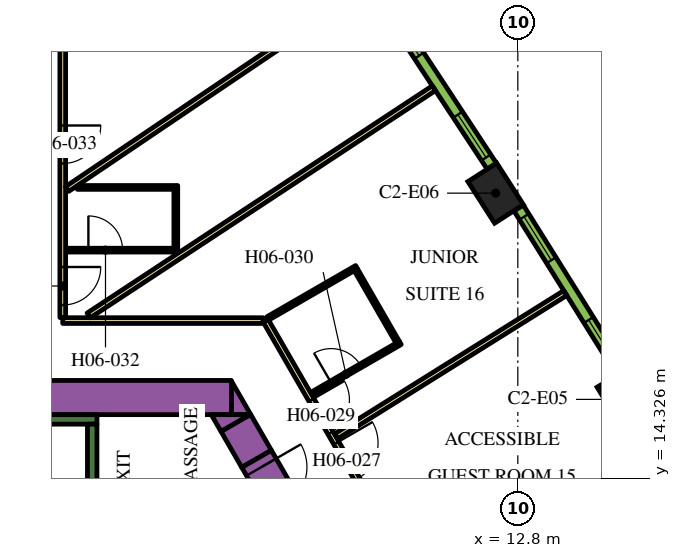
"""IFC4 building model, lengths in metres.
Left out: names, types, materials, properties, quantities, classifications, styles, units other than length and angle.
Written with IfcOpenShell. Run it as: python <this file> out.ifc"""

import sys

from ifc_helpers import new_model, si_unit, direction, frame, frame_2d, origin, origin_2d, place, context, subcontext, project, spatial, polyline, rectangle, outline, extrude, element, fill, save


model = new_model("IFC4")
c1 = context("Model", 3, precision=1e-05, world=origin(), true_north=direction((0.0, 1.0)))
c2 = subcontext(c1, "Body", "Model", "MODEL_VIEW")
j1 = project(units=[si_unit("LENGTHUNIT", "METRE"), si_unit("PLANEANGLEUNIT", "RADIAN")], contexts=[c1])
p1 = place(None, origin())
s1 = spatial("IfcSite", under=j1, at=p1, CompositionType="ELEMENT")
p2 = place(p1, origin())
s2 = spatial("IfcBuilding", under=s1, at=p2, CompositionType="ELEMENT")
p3 = place(p2, frame((0.0, 0.0, 87.6)))
s3 = spatial("IfcBuildingStorey", under=s2, at=p3, CompositionType="ELEMENT", Elevation=87.6)
for number, where, z_axis, x_axis in (
    (1, (15.609, 16.402, 0.0), (0.0, 0.0, 1.0), (-0.52, 0.854, 0.0)),
    (2, (12.217, 21.828, 0.0), (0.0, 0.0, 1.0), (-0.54, 0.842, 0.0)),
):
    element("IfcColumn", number, at=place(p3, frame(where, z_axis=z_axis, x_axis=x_axis)), inside=s3, PredefinedType="COLUMN", context=c2, shape_type="SweptSolid", body=[
        extrude(rectangle(XDim=1.3, YDim=0.9, at=origin_2d()), origin(), (0.0, 0.0, 1.0), 3.9),
    ])
p4 = place(p3, frame((-4.224, 16.45, 0.0), z_axis=(0.0, 0.0, 1.0), x_axis=(1.0, 0.0, 0.0)))
e3 = element("IfcWall", 3, at=p4, inside=s3, PredefinedType="SOLIDWALL", context=c2, shape_type="SweptSolid", body=[
    extrude(rectangle(XDim=9.488, YDim=0.9, at=frame_2d((4.744, 0.0))), origin(), (0.0, 0.0, 1.0), 3.9),
])
p5 = place(p3, origin())
e4 = element("IfcWall", 4, at=p5, inside=s3, PredefinedType="SOLIDWALL", context=c2, shape_type="SweptSolid", body=[
    extrude(outline(polyline([(5.265, 16.0), (5.265, 16.88), (5.773, 16.0), (5.265, 16.0)])), origin(), (0.0, 0.0, 1.0), 3.9),
])
p6 = place(p3, frame((5.926, 14.836, 0.0), z_axis=(0.0, 0.0, 1.0), x_axis=(-0.500076735116, 0.865981096212, 0.0)))
e5 = element("IfcWall", 5, at=p6, inside=s3, PredefinedType="SOLIDWALL", context=c2, shape_type="SweptSolid", body=[
    extrude(rectangle(XDim=1.094, YDim=0.9, at=frame_2d((0.547, 0.0))), origin(), (0.0, 0.0, 1.0), 3.9),
])
e6 = element("IfcWall", 6, at=p5, inside=s3, PredefinedType="SOLIDWALL", context=c2, shape_type="SweptSolid", body=[
    extrude(outline(polyline([(4.734, 16.0), (5.75, 16.0), (4.988, 15.56), (4.734, 16.0)])), origin(), (0.0, 0.0, 1.0), 3.9),
])
p7 = place(p3, frame((-1.725, 15.875, 0.0), z_axis=(0.0, 0.0, 1.0), x_axis=(1.0, 0.0, 0.0)))
e7 = element("IfcWall", 7, at=p7, inside=s3, PredefinedType="SOLIDWALL", context=c2, shape_type="SweptSolid", body=[
    extrude(rectangle(XDim=3.45, YDim=0.25, at=frame_2d((1.725, 0.0))), origin(), (0.0, 0.0, 1.0), 3.9),
])
p8 = place(p3, frame((1.6, 8.95, 0.0), z_axis=(0.0, 0.0, 1.0), x_axis=(0.0, 1.0, 0.0)))
e8 = element("IfcWall", 8, at=p8, inside=s3, PredefinedType="SOLIDWALL", context=c2, shape_type="SweptSolid", body=[
    extrude(rectangle(XDim=6.8, YDim=0.25, at=frame_2d((3.4, 0.0))), origin(), (0.0, 0.0, 1.0), 3.9),
])
p9 = place(p3, frame((5.926, 14.836, 0.0), z_axis=(0.0, 0.0, 1.0), x_axis=(0.500062241894, -0.865989465428, 0.0)))
e9 = element("IfcWall", 9, at=p9, inside=s3, PredefinedType="SOLIDWALL", context=c2, shape_type="SweptSolid", body=[
    extrude(rectangle(XDim=1.7, YDim=0.9, at=frame_2d((0.85, 0.0))), origin(), (0.0, 0.0, 1.0), 3.9),
])
p10 = place(p9, frame((0.25, 0.0, 0.0)))
e10 = element("IfcOpeningElement", 10, at=p10, cuts=e9, PredefinedType="OPENING", context=c2, shape_type="SweptSolid", body=[
    extrude(rectangle(XDim=1.2, YDim=2.1, at=frame_2d((0.6, 1.05))), frame((0.0, 0.46, 0.0), z_axis=(0.0, -1.0, 0.0), x_axis=(1.0, 0.0, 0.0)), (0.0, 0.0, 1.0), 0.92),
])
p11 = place(p3, frame((6.163, 18.475, 0.0), z_axis=(0.0, 0.0, 1.0), x_axis=(0.500001317485, -0.866024643133, 0.0)))
e11 = element("IfcWall", 11, at=p11, inside=s3, PredefinedType="PARTITIONING", context=c2, shape_type="SweptSolid", body=[
    extrude(rectangle(XDim=25.767, YDim=0.15, at=frame_2d((12.883, 0.0))), origin(), (0.0, 0.0, 1.0), 2.75),
])
p12 = place(p11, frame((24.241, 0.0, 0.0)))
e12 = element("IfcOpeningElement", 12, at=p12, cuts=e11, PredefinedType="OPENING", context=c2, shape_type="SweptSolid", body=[
    extrude(rectangle(XDim=1.0, YDim=2.1, at=frame_2d((0.5, 1.05))), frame((0.0, 0.085, 0.0), z_axis=(0.0, -1.0, 0.0), x_axis=(1.0, 0.0, 0.0)), (0.0, 0.0, 1.0), 0.17),
])
p13 = place(p11, frame((13.144, 0.0, 0.0)))
e13 = element("IfcOpeningElement", 13, at=p13, cuts=e11, PredefinedType="OPENING", context=c2, shape_type="SweptSolid", body=[
    extrude(rectangle(XDim=1.0, YDim=2.1, at=frame_2d((0.5, 1.05))), frame((0.0, 0.085, 0.0), z_axis=(0.0, -1.0, 0.0), x_axis=(1.0, 0.0, 0.0)), (0.0, 0.0, 1.0), 0.17),
])
p14 = place(p11, frame((10.874, 0.0, 0.0)))
e14 = element("IfcOpeningElement", 14, at=p14, cuts=e11, PredefinedType="OPENING", context=c2, shape_type="SweptSolid", body=[
    extrude(rectangle(XDim=0.9, YDim=2.1, at=frame_2d((0.45, 1.05))), frame((0.0, 0.085, 0.0), z_axis=(0.0, -1.0, 0.0), x_axis=(1.0, 0.0, 0.0)), (0.0, 0.0, 1.0), 0.17),
])
p15 = place(p11, frame((3.718, 0.0, 0.0)))
e15 = element("IfcOpeningElement", 15, at=p15, cuts=e11, PredefinedType="OPENING", context=c2, shape_type="SweptSolid", body=[
    extrude(rectangle(XDim=1.1, YDim=2.1, at=frame_2d((0.55, 1.05))), frame((0.0, 0.085, 0.0), z_axis=(0.0, -1.0, 0.0), x_axis=(1.0, 0.0, 0.0)), (0.0, 0.0, 1.0), 0.17),
])
p16 = place(p11, frame((2.411, 0.0, 0.0)))
e16 = element("IfcOpeningElement", 16, at=p16, cuts=e11, PredefinedType="OPENING", context=c2, shape_type="SweptSolid", body=[
    extrude(rectangle(XDim=1.0, YDim=2.1, at=frame_2d((0.5, 1.05))), frame((0.0, 0.085, 0.0), z_axis=(0.0, -1.0, 0.0), x_axis=(1.0, 0.0, 0.0)), (0.0, 0.0, 1.0), 0.17),
])
p17 = place(p3, frame((0.825, 18.475, 0.0), z_axis=(0.0, 0.0, 1.0), x_axis=(1.0, 0.0, 0.0)))
e17 = element("IfcWall", 17, at=p17, inside=s3, PredefinedType="PARTITIONING", context=c2, shape_type="SweptSolid", body=[
    extrude(rectangle(XDim=5.268, YDim=0.15, at=frame_2d((2.634, 0.0))), origin(), (0.0, 0.0, 1.0), 2.75),
])
p18 = place(p3, frame((0.825, 32.098, 0.0), z_axis=(0.0, 0.0, 1.0), x_axis=(0.0, -1.0, 0.0)))
e18 = element("IfcWall", 18, at=p18, inside=s3, PredefinedType="PARTITIONING", context=c2, shape_type="SweptSolid", body=[
    extrude(rectangle(XDim=13.543, YDim=0.15, at=frame_2d((6.772, 0.0))), origin(), (0.0, 0.0, 1.0), 2.75),
])
p19 = place(p18, frame((12.213, 0.0, 0.0)))
e19 = element("IfcOpeningElement", 19, at=p19, cuts=e18, PredefinedType="OPENING", context=c2, shape_type="SweptSolid", body=[
    extrude(rectangle(XDim=1.0, YDim=2.1, at=frame_2d((0.5, 1.05))), frame((0.0, 0.085, 0.0), z_axis=(0.0, -1.0, 0.0), x_axis=(1.0, 0.0, 0.0)), (0.0, 0.0, 1.0), 0.17),
])
p20 = place(p18, frame((8.49, 0.0, 0.0)))
e20 = element("IfcOpeningElement", 20, at=p20, cuts=e18, PredefinedType="OPENING", context=c2, shape_type="SweptSolid", body=[
    extrude(rectangle(XDim=1.0, YDim=2.1, at=frame_2d((0.5, 1.05))), frame((0.0, 0.085, 0.0), z_axis=(0.0, -1.0, 0.0), x_axis=(1.0, 0.0, 0.0)), (0.0, 0.0, 1.0), 0.17),
])
p21 = place(p3, frame((8.326, 26.923, 0.0), z_axis=(0.0, 0.0, 1.0), x_axis=(-0.828836601893, -0.5594907393, 0.0)))
e21 = element("IfcWall", 21, at=p21, inside=s3, PredefinedType="PARTITIONING", context=c2, shape_type="SweptSolid", body=[
    extrude(rectangle(XDim=8.909, YDim=0.15, at=frame_2d((4.455, 0.0))), origin(), (0.0, 0.0, 1.0), 2.75),
])
p22 = place(p3, frame((10.592, 24.589, 0.0), z_axis=(0.0, 0.0, 1.0), x_axis=(-0.835337323748, -0.549737715236, 0.0)))
e22 = element("IfcWall", 22, at=p22, inside=s3, PredefinedType="PARTITIONING", context=c2, shape_type="SweptSolid", body=[
    extrude(rectangle(XDim=10.875, YDim=0.15, at=frame_2d((5.438, 0.0))), origin(), (0.0, 0.0, 1.0), 2.75),
])
p23 = place(p3, frame((14.049, 19.2, 0.0), z_axis=(0.0, 0.0, 1.0), x_axis=(-0.847955867271, -0.530066832731, 0.0)))
e23 = element("IfcWall", 23, at=p23, inside=s3, PredefinedType="PARTITIONING", context=c2, shape_type="SweptSolid", body=[
    extrude(rectangle(XDim=7.111, YDim=0.15, at=frame_2d((3.556, 0.0))), origin(), (0.0, 0.0, 1.0), 2.75),
])
p24 = place(p3, frame((7.368, 16.538, 0.0), z_axis=(0.0, 0.0, 1.0), x_axis=(0.866036505625, 0.499980770555, 0.0)))
e24 = element("IfcWall", 24, at=p24, inside=s3, PredefinedType="PARTITIONING", context=c2, shape_type="SweptSolid", body=[
    extrude(rectangle(XDim=2.7, YDim=0.1, at=frame_2d((1.35, 0.0))), origin(), (0.0, 0.0, 1.0), 2.75),
])
p25 = place(p24, frame((0.6, 0.0, 0.0)))
e25 = element("IfcOpeningElement", 25, at=p25, cuts=e24, PredefinedType="OPENING", context=c2, shape_type="SweptSolid", body=[
    extrude(rectangle(XDim=0.9, YDim=2.1, at=frame_2d((0.45, 1.05))), frame((0.0, 0.06, 0.0), z_axis=(0.0, -1.0, 0.0), x_axis=(1.0, 0.0, 0.0)), (0.0, 0.0, 1.0), 0.12),
])
p26 = place(p3, frame((9.638, 17.906, 0.0), z_axis=(0.0, 0.0, 1.0), x_axis=(-0.50002983664, 0.866008176907, 0.0)))
e26 = element("IfcWall", 26, at=p26, inside=s3, PredefinedType="PARTITIONING", context=c2, shape_type="SweptSolid", body=[
    extrude(rectangle(XDim=2.2, YDim=0.1, at=frame_2d((1.1, 0.0))), origin(), (0.0, 0.0, 1.0), 2.75),
])
p27 = place(p3, frame((6.218, 18.53, 0.0), z_axis=(0.0, 0.0, 1.0), x_axis=(0.86599734893, 0.500048589285, 0.0)))
e27 = element("IfcWall", 27, at=p27, inside=s3, PredefinedType="PARTITIONING", context=c2, shape_type="SweptSolid", body=[
    extrude(rectangle(XDim=2.7, YDim=0.1, at=frame_2d((1.35, 0.0))), origin(), (0.0, 0.0, 1.0), 2.75),
])
p28 = place(p3, frame((0.9, 20.329, 0.0), z_axis=(0.0, 0.0, 1.0), x_axis=(1.0, 0.0, 0.0)))
e28 = element("IfcWall", 28, at=p28, inside=s3, PredefinedType="PARTITIONING", context=c2, shape_type="SweptSolid", body=[
    extrude(rectangle(XDim=2.95, YDim=0.1, at=frame_2d((1.475, 0.0))), origin(), (0.0, 0.0, 1.0), 2.75),
])
p29 = place(p28, frame((0.6, 0.0, 0.0)))
e29 = element("IfcOpeningElement", 29, at=p29, cuts=e28, PredefinedType="OPENING", context=c2, shape_type="SweptSolid", body=[
    extrude(rectangle(XDim=0.9, YDim=2.1, at=frame_2d((0.45, 1.05))), frame((0.0, 0.06, 0.0), z_axis=(0.0, -1.0, 0.0), x_axis=(1.0, 0.0, 0.0)), (0.0, 0.0, 1.0), 0.12),
])
p30 = place(p3, frame((3.8, 20.378, 0.0), z_axis=(0.0, 0.0, 1.0), x_axis=(0.0, 1.0, 0.0)))
e30 = element("IfcWall", 30, at=p30, inside=s3, PredefinedType="PARTITIONING", context=c2, shape_type="SweptSolid", body=[
    extrude(rectangle(XDim=1.55, YDim=0.1, at=frame_2d((0.775, 0.0))), origin(), (0.0, 0.0, 1.0), 2.75),
])
p31 = place(p3, frame((1.21, 21.979, 0.0), z_axis=(0.0, 0.0, 1.0), x_axis=(1.0, 0.0, 0.0)))
e31 = element("IfcWall", 31, at=p31, inside=s3, PredefinedType="PARTITIONING", context=c2, shape_type="SweptSolid", body=[
    extrude(rectangle(XDim=2.64, YDim=0.1, at=frame_2d((1.32, 0.0))), origin(), (0.0, 0.0, 1.0), 2.75),
])
p32 = place(p3, frame((15.524, 17.114, 0.0), z_axis=(0.0, 0.0, 1.0), x_axis=(-0.530072082134, 0.847952585787, 0.0)))
e32 = element("IfcWall", 32, at=p32, inside=s3, PredefinedType="SOLIDWALL", context=c2, shape_type="SweptSolid", body=[
    extrude(rectangle(XDim=5.1, YDim=0.29, at=frame_2d((2.55, 0.0))), origin(), (0.0, 0.0, 1.0), 3.65),
])
p33 = place(p32, frame((0.273, 0.0, 0.9)))
e33 = element("IfcOpeningElement", 33, at=p33, cuts=e32, PredefinedType="OPENING", context=c2, shape_type="SweptSolid", body=[
    extrude(rectangle(XDim=1.35, YDim=2.15, at=frame_2d((0.675, 1.075))), frame((0.0, 0.155, 0.0), z_axis=(0.0, -1.0, 0.0), x_axis=(1.0, 0.0, 0.0)), (0.0, 0.0, 1.0), 0.31),
])
p34 = place(p32, frame((3.478, 0.0, 0.9)))
e34 = element("IfcOpeningElement", 34, at=p34, cuts=e32, PredefinedType="OPENING", context=c2, shape_type="SweptSolid", body=[
    extrude(rectangle(XDim=1.35, YDim=2.15, at=frame_2d((0.675, 1.075))), frame((0.0, 0.155, 0.0), z_axis=(0.0, -1.0, 0.0), x_axis=(1.0, 0.0, 0.0)), (0.0, 0.0, 1.0), 0.31),
])
p35 = place(p3, frame((12.115, 22.539, 0.0), z_axis=(0.0, 0.0, 1.0), x_axis=(-0.549741341923, 0.835334937005, 0.0)))
e35 = element("IfcWall", 35, at=p35, inside=s3, PredefinedType="SOLIDWALL", context=c2, shape_type="SweptSolid", body=[
    extrude(rectangle(XDim=5.1, YDim=0.29, at=frame_2d((2.55, 0.0))), origin(), (0.0, 0.0, 1.0), 3.65),
])
p36 = place(p35, frame((0.273, 0.0, 0.9)))
e36 = element("IfcOpeningElement", 36, at=p36, cuts=e35, PredefinedType="OPENING", context=c2, shape_type="SweptSolid", body=[
    extrude(rectangle(XDim=1.35, YDim=2.15, at=frame_2d((0.675, 1.075))), frame((0.0, 0.155, 0.0), z_axis=(0.0, -1.0, 0.0), x_axis=(1.0, 0.0, 0.0)), (0.0, 0.0, 1.0), 0.31),
])
p37 = place(p35, frame((3.478, 0.0, 0.9)))
e37 = element("IfcOpeningElement", 37, at=p37, cuts=e35, PredefinedType="OPENING", context=c2, shape_type="SweptSolid", body=[
    extrude(rectangle(XDim=1.35, YDim=2.15, at=frame_2d((0.675, 1.075))), frame((0.0, 0.155, 0.0), z_axis=(0.0, -1.0, 0.0), x_axis=(1.0, 0.0, 0.0)), (0.0, 0.0, 1.0), 0.31),
])
p38 = place(p10, origin())
e38 = element("IfcDoor", 38, at=p38, inside=s3, OperationType="SINGLE_SWING_LEFT", PredefinedType="DOOR", context=c2, shape_type="SweptSolid", body=[
    extrude(rectangle(XDim=1.2, YDim=2.1, at=frame_2d((0.6, 1.05))), frame((0.0, 0.025, 0.0), z_axis=(0.0, -1.0, 0.0), x_axis=(1.0, 0.0, 0.0)), (0.0, 0.0, 1.0), 0.05),
])
fill(e10, e38)
p39 = place(p15, origin())
e39 = element("IfcDoor", 39, at=p39, inside=s3, OperationType="SINGLE_SWING_LEFT", PredefinedType="DOOR", context=c2, shape_type="SweptSolid", body=[
    extrude(rectangle(XDim=1.1, YDim=2.1, at=frame_2d((0.55, 1.05))), frame((0.0, 0.025, 0.0), z_axis=(0.0, -1.0, 0.0), x_axis=(1.0, 0.0, 0.0)), (0.0, 0.0, 1.0), 0.05),
])
fill(e15, e39)
p40 = place(p16, origin())
e40 = element("IfcDoor", 40, at=p40, inside=s3, OperationType="SINGLE_SWING_RIGHT", PredefinedType="DOOR", context=c2, shape_type="SweptSolid", body=[
    extrude(rectangle(XDim=1.0, YDim=2.1, at=frame_2d((0.5, 1.05))), frame((0.0, 0.025, 0.0), z_axis=(0.0, -1.0, 0.0), x_axis=(1.0, 0.0, 0.0)), (0.0, 0.0, 1.0), 0.05),
])
fill(e16, e40)
p41 = place(p25, origin())
e41 = element("IfcDoor", 41, at=p41, inside=s3, OperationType="SINGLE_SWING_LEFT", PredefinedType="DOOR", context=c2, shape_type="SweptSolid", body=[
    extrude(rectangle(XDim=0.9, YDim=2.1, at=frame_2d((0.45, 1.05))), frame((0.0, 0.025, 0.0), z_axis=(0.0, -1.0, 0.0), x_axis=(1.0, 0.0, 0.0)), (0.0, 0.0, 1.0), 0.05),
])
fill(e25, e41)
p42 = place(p19, origin())
e42 = element("IfcDoor", 42, at=p42, inside=s3, OperationType="SINGLE_SWING_RIGHT", PredefinedType="DOOR", context=c2, shape_type="SweptSolid", body=[
    extrude(rectangle(XDim=1.0, YDim=2.1, at=frame_2d((0.5, 1.05))), frame((0.0, 0.025, 0.0), z_axis=(0.0, -1.0, 0.0), x_axis=(1.0, 0.0, 0.0)), (0.0, 0.0, 1.0), 0.05),
])
fill(e19, e42)
p43 = place(p29, origin())
e43 = element("IfcDoor", 43, at=p43, inside=s3, OperationType="SINGLE_SWING_LEFT", PredefinedType="DOOR", context=c2, shape_type="SweptSolid", body=[
    extrude(rectangle(XDim=0.9, YDim=2.1, at=frame_2d((0.45, 1.05))), frame((0.0, 0.025, 0.0), z_axis=(0.0, -1.0, 0.0), x_axis=(1.0, 0.0, 0.0)), (0.0, 0.0, 1.0), 0.05),
])
fill(e29, e43)
p44 = place(p20, origin())
e44 = element("IfcDoor", 44, at=p44, inside=s3, OperationType="SINGLE_SWING_RIGHT", PredefinedType="DOOR", context=c2, shape_type="SweptSolid", body=[
    extrude(rectangle(XDim=1.0, YDim=2.1, at=frame_2d((0.5, 1.05))), frame((0.0, 0.025, 0.0), z_axis=(0.0, -1.0, 0.0), x_axis=(1.0, 0.0, 0.0)), (0.0, 0.0, 1.0), 0.05),
])
fill(e20, e44)
p45 = place(p33, origin())
e45 = element("IfcWindow", 45, at=p45, inside=s3, PartitioningType="DOUBLE_PANEL_VERTICAL", PredefinedType="WINDOW", context=c2, shape_type="SweptSolid", body=[
    extrude(rectangle(XDim=1.35, YDim=2.15, at=frame_2d((0.675, 1.075))), frame((0.0, 0.015, 0.0), z_axis=(0.0, -1.0, 0.0), x_axis=(1.0, 0.0, 0.0)), (0.0, 0.0, 1.0), 0.06),
])
fill(e33, e45)
p46 = place(p34, origin())
e46 = element("IfcWindow", 46, at=p46, inside=s3, PartitioningType="DOUBLE_PANEL_VERTICAL", PredefinedType="WINDOW", context=c2, shape_type="SweptSolid", body=[
    extrude(rectangle(XDim=1.35, YDim=2.15, at=frame_2d((0.675, 1.075))), frame((0.0, 0.015, 0.0), z_axis=(0.0, -1.0, 0.0), x_axis=(1.0, 0.0, 0.0)), (0.0, 0.0, 1.0), 0.06),
])
fill(e34, e46)
p47 = place(p36, origin())
e47 = element("IfcWindow", 47, at=p47, inside=s3, PartitioningType="DOUBLE_PANEL_VERTICAL", PredefinedType="WINDOW", context=c2, shape_type="SweptSolid", body=[
    extrude(rectangle(XDim=1.35, YDim=2.15, at=frame_2d((0.675, 1.075))), frame((0.0, 0.015, 0.0), z_axis=(0.0, -1.0, 0.0), x_axis=(1.0, 0.0, 0.0)), (0.0, 0.0, 1.0), 0.06),
])
fill(e36, e47)
p48 = place(p37, origin())
e48 = element("IfcWindow", 48, at=p48, inside=s3, PartitioningType="DOUBLE_PANEL_VERTICAL", PredefinedType="WINDOW", context=c2, shape_type="SweptSolid", body=[
    extrude(rectangle(XDim=1.35, YDim=2.15, at=frame_2d((0.675, 1.075))), frame((0.0, 0.015, 0.0), z_axis=(0.0, -1.0, 0.0), x_axis=(1.0, 0.0, 0.0)), (0.0, 0.0, 1.0), 0.06),
])
fill(e37, e48)
save(model, sys.argv[1])
